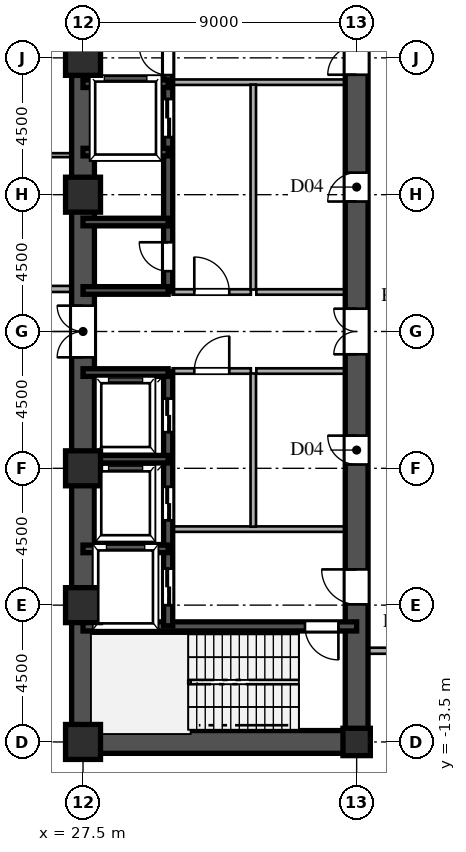
"""IFC4 building model, lengths in metres.
Left out: names, types, materials, properties, quantities, classifications, styles, units other than length and angle.
Written with IfcOpenShell. Run it as: python <this file> out.ifc"""

import sys

from ifc_helpers import new_model, si_unit, direction, frame, frame_2d, origin, origin_2d, place, context, subcontext, project, spatial, rectangle, hollow_rectangle, i_section, extrude, source, transform, mapped, element, fill, save


model = new_model("IFC4")
c1 = context("Model", 3, precision=1e-05, world=origin(), true_north=direction((0.0, 1.0)))
c2 = subcontext(c1, "Body", "Model", "MODEL_VIEW")
j1 = project(units=[si_unit("LENGTHUNIT", "METRE"), si_unit("PLANEANGLEUNIT", "RADIAN")], contexts=[c1])
p1 = place(None, origin())
s1 = spatial("IfcSite", under=j1, at=p1, CompositionType="ELEMENT")
p2 = place(p1, origin())
s2 = spatial("IfcBuilding", under=s1, at=p2, CompositionType="ELEMENT")
p3 = place(p2, frame((0.0, 0.0, -4.8)))
s3 = spatial("IfcBuildingStorey", under=s2, at=p3, CompositionType="ELEMENT", Elevation=-4.8)
m1 = source(origin(), c2, "Body", "SweptSolid", [
    extrude(hollow_rectangle(XDim=1.15, YDim=1.15, WallThickness=0.048, at=origin_2d()), origin(), (0.0, 0.0, 1.0), 4.8),
])
for number, where, z_axis, x_axis in (
    (1, (27.5, -13.5, 0.0), (0.0, 0.0, 1.0), (1.0, 0.0, 0.0)),
    (2, (27.5, -9.0, 0.0), (0.0, 0.0, 1.0), (1.0, 0.0, 0.0)),
    (3, (27.5, -4.5, 0.0), (0.0, 0.0, 1.0), (1.0, 0.0, 0.0)),
    (4, (27.5, 4.5, 0.0), (0.0, 0.0, 1.0), (1.0, 0.0, 0.0)),
    (5, (27.5, 9.0, 0.0), (0.0, 0.0, 1.0), (1.0, 0.0, 0.0)),
):
    element("IfcColumn", number, at=place(p3, frame(where, z_axis=z_axis, x_axis=x_axis)), inside=s3, PredefinedType="COLUMN", context=c2, shape_type="MappedRepresentation", body=[
        mapped(m1, transform((0.0, 0.0, 0.0), scale=1.0)),
    ])
m2 = source(origin(), c2, "Body", "SweptSolid", [
    extrude(i_section(OverallWidth=0.9, OverallDepth=0.9, WebThickness=0.036, FlangeThickness=0.055, at=origin_2d()), origin(), (0.0, 0.0, 1.0), 4.8),
])
p4 = place(p3, frame((36.5, -13.5, 0.0), z_axis=(0.0, 0.0, 1.0), x_axis=(1.0, 0.0, 0.0)))
e6 = element("IfcColumn", 6, at=p4, inside=s3, PredefinedType="COLUMN", context=c2, shape_type="MappedRepresentation", body=[
    mapped(m2, transform((0.0, 0.0, 0.0), scale=1.0)),
])
for number, where, z_axis, x_axis in (
    (7, (27.5, -13.5, 0.0), (0.0, 0.0, 1.0), (0.0, 1.0, 0.0)),
    (8, (27.5, 1.3, 0.0), (0.0, 0.0, 1.0), (0.0, 1.0, 0.0)),
):
    element("IfcWall", number, at=place(p3, frame(where, z_axis=z_axis, x_axis=x_axis)), inside=s3, PredefinedType="SHEAR", context=c2, shape_type="SweptSolid", body=[
        extrude(rectangle(XDim=12.2, YDim=0.75, at=frame_2d((6.1, 0.0))), origin(), (0.0, 0.0, 1.0), 4.52),
    ])
p5 = place(p3, frame((27.5, -1.3, 0.0), z_axis=(0.0, 0.0, 1.0), x_axis=(0.0, 1.0, 0.0)))
e9 = element("IfcWall", 9, at=p5, inside=s3, PredefinedType="SHEAR", context=c2, shape_type="SweptSolid", body=[
    extrude(rectangle(XDim=2.6, YDim=0.75, at=frame_2d((1.3, 0.0))), origin(), (0.0, 0.0, 1.0), 4.52),
])
p6 = place(p5, frame((0.45, 0.0, 0.0)))
e10 = element("IfcOpeningElement", 10, at=p6, cuts=e9, PredefinedType="OPENING", context=c2, shape_type="SweptSolid", body=[
    extrude(rectangle(XDim=1.7, YDim=2.35, at=frame_2d((0.85, 1.175))), frame((0.0, 0.385, 0.0), z_axis=(0.0, -1.0, 0.0), x_axis=(1.0, 0.0, 0.0)), (0.0, 0.0, 1.0), 0.77),
])
p7 = place(p3, frame((27.5, -13.5, 0.0), z_axis=(0.0, 0.0, 1.0), x_axis=(1.0, 0.0, 0.0)))
e11 = element("IfcWall", 11, at=p7, inside=s3, PredefinedType="SHEAR", context=c2, shape_type="SweptSolid", body=[
    extrude(rectangle(XDim=9.0, YDim=0.75, at=frame_2d((4.5, 0.0))), origin(), (0.0, 0.0, 1.0), 4.52),
])
p8 = place(p3, frame((36.5, -13.65, 0.0), z_axis=(0.0, 0.0, 1.0), x_axis=(0.0, 1.0, 0.0)))
e12 = element("IfcWall", 12, at=p8, inside=s3, PredefinedType="SHEAR", context=c2, shape_type="SweptSolid", body=[
    extrude(rectangle(XDim=7.15, YDim=0.75, at=frame_2d((3.575, 0.0))), origin(), (0.0, 0.0, 1.0), 4.52),
])
p9 = place(p8, frame((4.675, 0.0, 0.0)))
e13 = element("IfcOpeningElement", 13, at=p9, cuts=e12, PredefinedType="OPENING", context=c2, shape_type="SweptSolid", body=[
    extrude(rectangle(XDim=1.15, YDim=2.2, at=frame_2d((0.575, 1.1))), frame((0.0, 0.385, 0.0), z_axis=(0.0, -1.0, 0.0), x_axis=(1.0, 0.0, 0.0)), (0.0, 0.0, 1.0), 0.77),
])
p10 = place(p3, frame((36.5, -1.3, 0.0), z_axis=(0.0, 0.0, 1.0), x_axis=(0.0, 1.0, 0.0)))
e14 = element("IfcWall", 14, at=p10, inside=s3, PredefinedType="SHEAR", context=c2, shape_type="SweptSolid", body=[
    extrude(rectangle(XDim=2.6, YDim=0.75, at=frame_2d((1.3, 0.0))), origin(), (0.0, 0.0, 1.0), 4.52),
])
p11 = place(p10, frame((0.55, 0.0, 0.0)))
e15 = element("IfcOpeningElement", 15, at=p11, cuts=e14, PredefinedType="OPENING", context=c2, shape_type="SweptSolid", body=[
    extrude(rectangle(XDim=1.5, YDim=2.3, at=frame_2d((0.75, 1.15))), frame((0.0, 0.385, 0.0), z_axis=(0.0, -1.0, 0.0), x_axis=(1.0, 0.0, 0.0)), (0.0, 0.0, 1.0), 0.77),
])
p12 = place(p3, frame((36.5, 8.2, 0.0), z_axis=(0.0, 0.0, 1.0), x_axis=(0.0, 1.0, 0.0)))
e16 = element("IfcWall", 16, at=p12, inside=s3, PredefinedType="SHEAR", context=c2, shape_type="SweptSolid", body=[
    extrude(rectangle(XDim=5.45, YDim=0.75, at=frame_2d((2.725, 0.0))), origin(), (0.0, 0.0, 1.0), 4.52),
])
p13 = place(p12, frame((0.245, 0.0, 0.0)))
e17 = element("IfcOpeningElement", 17, at=p13, cuts=e16, PredefinedType="OPENING", context=c2, shape_type="SweptSolid", body=[
    extrude(rectangle(XDim=0.95, YDim=2.15, at=frame_2d((0.475, 1.075))), frame((0.0, 0.385, 0.0), z_axis=(0.0, -1.0, 0.0), x_axis=(1.0, 0.0, 0.0)), (0.0, 0.0, 1.0), 0.77),
])
p14 = place(p3, frame((36.5, -6.5, 0.0), z_axis=(0.0, 0.0, 1.0), x_axis=(0.0, 1.0, 0.0)))
e18 = element("IfcWall", 18, at=p14, inside=s3, PredefinedType="SHEAR", context=c2, shape_type="SweptSolid", body=[
    extrude(rectangle(XDim=5.2, YDim=0.75, at=frame_2d((2.6, 0.0))), origin(), (0.0, 0.0, 1.0), 4.52),
])
p15 = place(p14, frame((2.125, 0.0, 0.0)))
e19 = element("IfcOpeningElement", 19, at=p15, cuts=e18, PredefinedType="OPENING", context=c2, shape_type="SweptSolid", body=[
    extrude(rectangle(XDim=0.95, YDim=2.15, at=frame_2d((0.475, 1.075))), frame((0.0, 0.385, 0.0), z_axis=(0.0, -1.0, 0.0), x_axis=(1.0, 0.0, 0.0)), (0.0, 0.0, 1.0), 0.77),
])
p16 = place(p3, frame((36.5, 1.3, 0.0), z_axis=(0.0, 0.0, 1.0), x_axis=(0.0, 1.0, 0.0)))
e20 = element("IfcWall", 20, at=p16, inside=s3, PredefinedType="SHEAR", context=c2, shape_type="SweptSolid", body=[
    extrude(rectangle(XDim=6.9, YDim=0.75, at=frame_2d((3.45, 0.0))), origin(), (0.0, 0.0, 1.0), 4.52),
])
p17 = place(p16, frame((2.975, 0.0, 0.0)))
e21 = element("IfcOpeningElement", 21, at=p17, cuts=e20, PredefinedType="OPENING", context=c2, shape_type="SweptSolid", body=[
    extrude(rectangle(XDim=0.95, YDim=2.15, at=frame_2d((0.475, 1.075))), frame((0.0, 0.385, 0.0), z_axis=(0.0, -1.0, 0.0), x_axis=(1.0, 0.0, 0.0)), (0.0, 0.0, 1.0), 0.77),
])
p18 = place(p3, frame((27.5, -9.7, 0.0), z_axis=(0.0, 0.0, 1.0), x_axis=(1.0, 0.0, 0.0)))
e22 = element("IfcWall", 22, at=p18, inside=s3, PredefinedType="SHEAR", context=c2, shape_type="SweptSolid", body=[
    extrude(rectangle(XDim=9.0, YDim=0.3, at=frame_2d((4.5, 0.0))), origin(), (0.0, 0.0, 1.0), 4.52),
])
p19 = place(p18, frame((7.3, 0.0, 0.0)))
e23 = element("IfcOpeningElement", 23, at=p19, cuts=e22, PredefinedType="OPENING", context=c2, shape_type="SweptSolid", body=[
    extrude(rectangle(XDim=1.1, YDim=2.2, at=frame_2d((0.55, 1.1))), frame((0.0, 0.16, 0.0), z_axis=(0.0, -1.0, 0.0), x_axis=(1.0, 0.0, 0.0)), (0.0, 0.0, 1.0), 0.32),
])
for number, where, z_axis, x_axis in (
    (24, (27.5, -7.15, 0.0), (0.0, 0.0, 1.0), (1.0, 0.0, 0.0)),
    (25, (27.5, -4.2, 0.0), (0.0, 0.0, 1.0), (1.0, 0.0, 0.0)),
    (26, (27.5, -1.35, 0.0), (0.0, 0.0, 1.0), (1.0, 0.0, 0.0)),
    (27, (27.5, 1.35, 0.0), (0.0, 0.0, 1.0), (1.0, 0.0, 0.0)),
    (28, (27.5, 3.6, 0.0), (0.0, 0.0, 1.0), (1.0, 0.0, 0.0)),
    (29, (27.5, 5.9, 0.0), (0.0, 0.0, 1.0), (1.0, 0.0, 0.0)),
    (30, (27.5, 8.15, 0.0), (0.0, 0.0, 1.0), (1.0, 0.0, 0.0)),
):
    element("IfcWall", number, at=place(p3, frame(where, z_axis=z_axis, x_axis=x_axis)), inside=s3, PredefinedType="SHEAR", context=c2, shape_type="SweptSolid", body=[
        extrude(rectangle(XDim=2.8, YDim=0.25, at=frame_2d((1.4, 0.0))), origin(), (0.0, 0.0, 1.0), 4.52),
    ])
p20 = place(p3, frame((30.3, -9.68, 0.0), z_axis=(0.0, 0.0, 1.0), x_axis=(0.0, 1.0, 0.0)))
e31 = element("IfcWall", 31, at=p20, inside=s3, PredefinedType="SHEAR", context=c2, shape_type="SweptSolid", body=[
    extrude(rectangle(XDim=2.56, YDim=0.3, at=frame_2d((1.28, 0.0))), origin(), (0.0, 0.0, 1.0), 4.52),
])
p21 = place(p20, frame((0.68, 0.0, 0.0)))
e32 = element("IfcOpeningElement", 32, at=p21, cuts=e31, PredefinedType="OPENING", context=c2, shape_type="SweptSolid", body=[
    extrude(rectangle(XDim=1.2, YDim=2.25, at=frame_2d((0.6, 1.125))), frame((0.0, 0.16, 0.0), z_axis=(0.0, -1.0, 0.0), x_axis=(1.0, 0.0, 0.0)), (0.0, 0.0, 1.0), 0.32),
])
p22 = place(p3, frame((30.3, -7.12, 0.0), z_axis=(0.0, 0.0, 1.0), x_axis=(0.0, 1.0, 0.0)))
e33 = element("IfcWall", 33, at=p22, inside=s3, PredefinedType="SHEAR", context=c2, shape_type="SweptSolid", body=[
    extrude(rectangle(XDim=2.92, YDim=0.3, at=frame_2d((1.46, 0.0))), origin(), (0.0, 0.0, 1.0), 4.52),
])
p23 = place(p22, frame((0.91, 0.0, 0.0)))
e34 = element("IfcOpeningElement", 34, at=p23, cuts=e33, PredefinedType="OPENING", context=c2, shape_type="SweptSolid", body=[
    extrude(rectangle(XDim=1.1, YDim=2.2, at=frame_2d((0.55, 1.1))), frame((0.0, 0.16, 0.0), z_axis=(0.0, -1.0, 0.0), x_axis=(1.0, 0.0, 0.0)), (0.0, 0.0, 1.0), 0.32),
])
p24 = place(p3, frame((30.3, -4.2, 0.0), z_axis=(0.0, 0.0, 1.0), x_axis=(0.0, 1.0, 0.0)))
e35 = element("IfcWall", 35, at=p24, inside=s3, PredefinedType="SHEAR", context=c2, shape_type="SweptSolid", body=[
    extrude(rectangle(XDim=2.88, YDim=0.3, at=frame_2d((1.44, 0.0))), origin(), (0.0, 0.0, 1.0), 4.52),
])
p25 = place(p24, frame((0.89, 0.0, 0.0)))
e36 = element("IfcOpeningElement", 36, at=p25, cuts=e35, PredefinedType="OPENING", context=c2, shape_type="SweptSolid", body=[
    extrude(rectangle(XDim=1.1, YDim=2.2, at=frame_2d((0.55, 1.1))), frame((0.0, 0.16, 0.0), z_axis=(0.0, -1.0, 0.0), x_axis=(1.0, 0.0, 0.0)), (0.0, 0.0, 1.0), 0.32),
])
p26 = place(p3, frame((30.3, 1.32, 0.0), z_axis=(0.0, 0.0, 1.0), x_axis=(0.0, 1.0, 0.0)))
e37 = element("IfcWall", 37, at=p26, inside=s3, PredefinedType="SHEAR", context=c2, shape_type="SweptSolid", body=[
    extrude(rectangle(XDim=2.28, YDim=0.3, at=frame_2d((1.14, 0.0))), origin(), (0.0, 0.0, 1.0), 4.52),
])
p27 = place(p26, frame((0.665, 0.0, 0.0)))
e38 = element("IfcOpeningElement", 38, at=p27, cuts=e37, PredefinedType="OPENING", context=c2, shape_type="SweptSolid", body=[
    extrude(rectangle(XDim=0.95, YDim=2.15, at=frame_2d((0.475, 1.075))), frame((0.0, 0.16, 0.0), z_axis=(0.0, -1.0, 0.0), x_axis=(1.0, 0.0, 0.0)), (0.0, 0.0, 1.0), 0.32),
])
p28 = place(p3, frame((30.3, 3.6, 0.0), z_axis=(0.0, 0.0, 1.0), x_axis=(0.0, 1.0, 0.0)))
e39 = element("IfcWall", 39, at=p28, inside=s3, PredefinedType="SHEAR", context=c2, shape_type="SweptSolid", body=[
    extrude(rectangle(XDim=2.3, YDim=0.3, at=frame_2d((1.15, 0.0))), origin(), (0.0, 0.0, 1.0), 4.52),
])
p29 = place(p3, frame((30.3, 5.9, 0.0), z_axis=(0.0, 0.0, 1.0), x_axis=(0.0, 1.0, 0.0)))
e40 = element("IfcWall", 40, at=p29, inside=s3, PredefinedType="SHEAR", context=c2, shape_type="SweptSolid", body=[
    extrude(rectangle(XDim=2.25, YDim=0.3, at=frame_2d((1.125, 0.0))), origin(), (0.0, 0.0, 1.0), 4.52),
])
p30 = place(p29, frame((0.495, 0.0, 0.0)))
e41 = element("IfcOpeningElement", 41, at=p30, cuts=e40, PredefinedType="OPENING", context=c2, shape_type="SweptSolid", body=[
    extrude(rectangle(XDim=1.25, YDim=2.3, at=frame_2d((0.625, 1.15))), frame((0.0, 0.16, 0.0), z_axis=(0.0, -1.0, 0.0), x_axis=(1.0, 0.0, 0.0)), (0.0, 0.0, 1.0), 0.32),
])
p31 = place(p3, frame((30.3, 8.15, 0.0), z_axis=(0.0, 0.0, 1.0), x_axis=(0.0, 1.0, 0.0)))
e42 = element("IfcWall", 42, at=p31, inside=s3, PredefinedType="SHEAR", context=c2, shape_type="SweptSolid", body=[
    extrude(rectangle(XDim=1.53, YDim=0.3, at=frame_2d((0.765, 0.0))), origin(), (0.0, 0.0, 1.0), 4.52),
])
p32 = place(p31, frame((0.285, 0.0, 0.0)))
e43 = element("IfcOpeningElement", 43, at=p32, cuts=e42, PredefinedType="OPENING", context=c2, shape_type="SweptSolid", body=[
    extrude(rectangle(XDim=0.95, YDim=2.15, at=frame_2d((0.475, 1.075))), frame((0.0, 0.16, 0.0), z_axis=(0.0, -1.0, 0.0), x_axis=(1.0, 0.0, 0.0)), (0.0, 0.0, 1.0), 0.32),
])
for number, where, z_axis, x_axis in (
    (44, (30.45, -6.5, 0.0), (0.0, 0.0, 1.0), (1.0, 0.0, 0.0)),
    (45, (30.45, 8.2, 0.0), (0.0, 0.0, 1.0), (1.0, 0.0, 0.0)),
):
    element("IfcWall", number, at=place(p3, frame(where, z_axis=z_axis, x_axis=x_axis)), inside=s3, PredefinedType="PARTITIONING", context=c2, shape_type="SweptSolid", body=[
        extrude(rectangle(XDim=5.7, YDim=0.18, at=frame_2d((2.85, 0.0))), origin(), (0.0, 0.0, 1.0), 4.52),
    ])
p33 = place(p3, frame((33.1, -6.42, 0.0), z_axis=(0.0, 0.0, 1.0), x_axis=(0.0, 1.0, 0.0)))
e46 = element("IfcWall", 46, at=p33, inside=s3, PredefinedType="PARTITIONING", context=c2, shape_type="SweptSolid", body=[
    extrude(rectangle(XDim=5.04, YDim=0.18, at=frame_2d((2.52, 0.0))), origin(), (0.0, 0.0, 1.0), 4.52),
])
p34 = place(p3, frame((33.1, 1.38, 0.0), z_axis=(0.0, 0.0, 1.0), x_axis=(0.0, 1.0, 0.0)))
e47 = element("IfcWall", 47, at=p34, inside=s3, PredefinedType="PARTITIONING", context=c2, shape_type="SweptSolid", body=[
    extrude(rectangle(XDim=6.74, YDim=0.18, at=frame_2d((3.37, 0.0))), origin(), (0.0, 0.0, 1.0), 4.52),
])
p35 = place(p3, frame((30.45, -1.3, 0.0), z_axis=(0.0, 0.0, 1.0), x_axis=(1.0, 0.0, 0.0)))
e48 = element("IfcWall", 48, at=p35, inside=s3, PredefinedType="PARTITIONING", context=c2, shape_type="SweptSolid", body=[
    extrude(rectangle(XDim=2.57, YDim=0.18, at=frame_2d((1.285, 0.0))), origin(), (0.0, 0.0, 1.0), 4.52),
])
p36 = place(p35, frame((0.71, 0.0, 0.0)))
e49 = element("IfcOpeningElement", 49, at=p36, cuts=e48, PredefinedType="OPENING", context=c2, shape_type="SweptSolid", body=[
    extrude(rectangle(XDim=1.15, YDim=2.2, at=frame_2d((0.575, 1.1))), frame((0.0, 0.1, 0.0), z_axis=(0.0, -1.0, 0.0), x_axis=(1.0, 0.0, 0.0)), (0.0, 0.0, 1.0), 0.2),
])
p37 = place(p3, frame((30.45, 1.3, 0.0), z_axis=(0.0, 0.0, 1.0), x_axis=(1.0, 0.0, 0.0)))
e50 = element("IfcWall", 50, at=p37, inside=s3, PredefinedType="PARTITIONING", context=c2, shape_type="SweptSolid", body=[
    extrude(rectangle(XDim=2.57, YDim=0.18, at=frame_2d((1.285, 0.0))), origin(), (0.0, 0.0, 1.0), 4.52),
])
p38 = place(p37, frame((0.71, 0.0, 0.0)))
e51 = element("IfcOpeningElement", 51, at=p38, cuts=e50, PredefinedType="OPENING", context=c2, shape_type="SweptSolid", body=[
    extrude(rectangle(XDim=1.15, YDim=2.2, at=frame_2d((0.575, 1.1))), frame((0.0, 0.1, 0.0), z_axis=(0.0, -1.0, 0.0), x_axis=(1.0, 0.0, 0.0)), (0.0, 0.0, 1.0), 0.2),
])
for number, where, z_axis, x_axis in (
    (52, (33.2, -1.3, 0.0), (0.0, 0.0, 1.0), (1.0, 0.0, 0.0)),
    (53, (33.2, 1.3, 0.0), (0.0, 0.0, 1.0), (1.0, 0.0, 0.0)),
):
    element("IfcWall", number, at=place(p3, frame(where, z_axis=z_axis, x_axis=x_axis)), inside=s3, PredefinedType="PARTITIONING", context=c2, shape_type="SweptSolid", body=[
        extrude(rectangle(XDim=2.95, YDim=0.18, at=frame_2d((1.475, 0.0))), origin(), (0.0, 0.0, 1.0), 4.52),
    ])
p39 = place(p3, frame((36.88, -10.5, 0.0), z_axis=(0.0, 0.0, 1.0), x_axis=(1.0, 0.0, 0.0)))
e54 = element("IfcWall", 54, at=p39, inside=s3, PredefinedType="PARTITIONING", context=c2, shape_type="SweptSolid", body=[
    extrude(rectangle(XDim=2.035, YDim=0.2, at=frame_2d((1.018, 0.0))), origin(), (0.0, 0.0, 1.0), 4.52),
])
p40 = place(p3, frame((-27.12, 1.4, 0.0), z_axis=(0.0, 0.0, 1.0), x_axis=(1.0, 0.0, 0.0)))
e55 = element("IfcWall", 55, at=p40, inside=s3, PredefinedType="PARTITIONING", context=c2, shape_type="SweptSolid", body=[
    extrude(rectangle(XDim=54.24, YDim=0.2, at=frame_2d((27.12, 0.0))), origin(), (0.0, 0.0, 1.0), 4.52),
])
p41 = place(p40, frame((19.545, 0.0, 0.0)))
e56 = element("IfcOpeningElement", 56, at=p41, cuts=e55, PredefinedType="OPENING", context=c2, shape_type="SweptSolid", body=[
    extrude(rectangle(XDim=1.15, YDim=2.2, at=frame_2d((0.575, 1.1))), frame((0.0, 0.11, 0.0), z_axis=(0.0, -1.0, 0.0), x_axis=(1.0, 0.0, 0.0)), (0.0, 0.0, 1.0), 0.22),
])
p42 = place(p40, frame((46.93, 0.0, 0.0)))
e57 = element("IfcOpeningElement", 57, at=p42, cuts=e55, PredefinedType="OPENING", context=c2, shape_type="SweptSolid", body=[
    extrude(rectangle(XDim=0.88, YDim=2.1, at=frame_2d((0.44, 1.05))), frame((0.0, 0.11, 0.0), z_axis=(0.0, -1.0, 0.0), x_axis=(1.0, 0.0, 0.0)), (0.0, 0.0, 1.0), 0.22),
])
p43 = place(p3, frame((18.085, 5.8, 0.0), z_axis=(0.0, 0.0, 1.0), x_axis=(1.0, 0.0, 0.0)))
e58 = element("IfcWall", 58, at=p43, inside=s3, PredefinedType="PARTITIONING", context=c2, shape_type="SweptSolid", body=[
    extrude(rectangle(XDim=9.035, YDim=0.13, at=frame_2d((4.518, 0.0))), origin(), (0.0, 0.0, 1.0), 4.52),
])
m3 = source(origin(), c2, "Body", "SweptSolid", [
    extrude(rectangle(XDim=1.7, YDim=2.35, at=frame_2d((0.85, 1.175))), frame((0.0, 0.025, 0.0), z_axis=(0.0, -1.0, 0.0), x_axis=(1.0, 0.0, 0.0)), (0.0, 0.0, 1.0), 0.05),
])
p44 = place(p6, origin())
e59 = element("IfcDoor", 59, at=p44, inside=s3, OperationType="DOUBLE_SWING_LEFT", PredefinedType="DOOR", context=c2, shape_type="MappedRepresentation", body=[
    mapped(m3, transform((0.0, 0.0, 0.0), scale=1.0)),
])
fill(e10, e59)
m4 = source(origin(), c2, "Body", "SweptSolid", [
    extrude(rectangle(XDim=1.15, YDim=2.2, at=frame_2d((0.575, 1.1))), frame((0.0, 0.025, 0.0), z_axis=(0.0, -1.0, 0.0), x_axis=(1.0, 0.0, 0.0)), (0.0, 0.0, 1.0), 0.05),
])
p45 = place(p9, origin())
e60 = element("IfcDoor", 60, at=p45, inside=s3, OperationType="SINGLE_SWING_RIGHT", PredefinedType="DOOR", context=c2, shape_type="MappedRepresentation", body=[
    mapped(m4, transform((0.0, 0.0, 0.0), scale=1.0)),
])
fill(e13, e60)
m5 = source(origin(), c2, "Body", "SweptSolid", [
    extrude(rectangle(XDim=1.5, YDim=2.3, at=frame_2d((0.75, 1.15))), frame((0.0, 0.025, 0.0), z_axis=(0.0, -1.0, 0.0), x_axis=(1.0, 0.0, 0.0)), (0.0, 0.0, 1.0), 0.05),
])
p46 = place(p11, origin())
e61 = element("IfcDoor", 61, at=p46, inside=s3, OperationType="DOUBLE_SWING_LEFT", PredefinedType="DOOR", context=c2, shape_type="MappedRepresentation", body=[
    mapped(m5, transform((0.0, 0.0, 0.0), scale=1.0)),
])
fill(e15, e61)
m6 = source(origin(), c2, "Body", "SweptSolid", [
    extrude(rectangle(XDim=0.95, YDim=2.15, at=frame_2d((0.475, 1.075))), frame((0.0, 0.025, 0.0), z_axis=(0.0, -1.0, 0.0), x_axis=(1.0, 0.0, 0.0)), (0.0, 0.0, 1.0), 0.05),
])
p47 = place(p13, origin())
e62 = element("IfcDoor", 62, at=p47, inside=s3, OperationType="SINGLE_SWING_LEFT", PredefinedType="DOOR", context=c2, shape_type="MappedRepresentation", body=[
    mapped(m6, transform((0.0, 0.0, 0.0), scale=1.0)),
])
fill(e17, e62)
p48 = place(p15, origin())
e63 = element("IfcDoor", 63, at=p48, inside=s3, OperationType="SINGLE_SWING_RIGHT", PredefinedType="DOOR", context=c2, shape_type="MappedRepresentation", body=[
    mapped(m6, transform((0.0, 0.0, 0.0), scale=1.0)),
])
fill(e19, e63)
p49 = place(p17, origin())
e64 = element("IfcDoor", 64, at=p49, inside=s3, OperationType="SINGLE_SWING_LEFT", PredefinedType="DOOR", context=c2, shape_type="MappedRepresentation", body=[
    mapped(m6, transform((0.0, 0.0, 0.0), scale=1.0)),
])
fill(e21, e64)
m7 = source(origin(), c2, "Body", "SweptSolid", [
    extrude(rectangle(XDim=1.1, YDim=2.2, at=frame_2d((0.55, 1.1))), frame((0.0, 0.025, 0.0), z_axis=(0.0, -1.0, 0.0), x_axis=(1.0, 0.0, 0.0)), (0.0, 0.0, 1.0), 0.05),
])
p50 = place(p19, frame((1.1, 0.0, 0.0), z_axis=(0.0, 0.0, 1.0), x_axis=(-1.0, 0.0, 0.0)))
e65 = element("IfcDoor", 65, at=p50, inside=s3, OperationType="SINGLE_SWING_RIGHT", PredefinedType="DOOR", context=c2, shape_type="MappedRepresentation", body=[
    mapped(m7, transform((0.0, 0.0, 0.0), scale=1.0)),
])
fill(e23, e65)
m8 = source(origin(), c2, "Body", "SweptSolid", [
    extrude(rectangle(XDim=1.2, YDim=2.25, at=frame_2d((0.6, 1.125))), frame((0.0, 0.025, 0.0), z_axis=(0.0, -1.0, 0.0), x_axis=(1.0, 0.0, 0.0)), (0.0, 0.0, 1.0), 0.05),
])
p51 = place(p21, origin())
e66 = element("IfcDoor", 66, at=p51, inside=s3, OperationType="DOUBLE_DOOR_SLIDING", PredefinedType="DOOR", context=c2, shape_type="MappedRepresentation", body=[
    mapped(m8, transform((0.0, 0.0, 0.0), scale=1.0)),
])
fill(e32, e66)
m9 = source(origin(), c2, "Body", "SweptSolid", [
    extrude(rectangle(XDim=1.1, YDim=2.2, at=frame_2d((0.55, 1.1))), frame((0.0, 0.025, 0.0), z_axis=(0.0, -1.0, 0.0), x_axis=(1.0, 0.0, 0.0)), (0.0, 0.0, 1.0), 0.05),
])
p52 = place(p23, origin())
e67 = element("IfcDoor", 67, at=p52, inside=s3, OperationType="DOUBLE_DOOR_SLIDING", PredefinedType="DOOR", context=c2, shape_type="MappedRepresentation", body=[
    mapped(m9, transform((0.0, 0.0, 0.0), scale=1.0)),
])
fill(e34, e67)
p53 = place(p25, origin())
e68 = element("IfcDoor", 68, at=p53, inside=s3, OperationType="DOUBLE_DOOR_SLIDING", PredefinedType="DOOR", context=c2, shape_type="MappedRepresentation", body=[
    mapped(m9, transform((0.0, 0.0, 0.0), scale=1.0)),
])
fill(e36, e68)
p54 = place(p27, origin())
e69 = element("IfcDoor", 69, at=p54, inside=s3, OperationType="SINGLE_SWING_RIGHT", PredefinedType="DOOR", context=c2, shape_type="MappedRepresentation", body=[
    mapped(m6, transform((0.0, 0.0, 0.0), scale=1.0)),
])
fill(e38, e69)
m10 = source(origin(), c2, "Body", "SweptSolid", [
    extrude(rectangle(XDim=1.25, YDim=2.3, at=frame_2d((0.625, 1.15))), frame((0.0, 0.025, 0.0), z_axis=(0.0, -1.0, 0.0), x_axis=(1.0, 0.0, 0.0)), (0.0, 0.0, 1.0), 0.05),
])
p55 = place(p30, origin())
e70 = element("IfcDoor", 70, at=p55, inside=s3, OperationType="DOUBLE_DOOR_SLIDING", PredefinedType="DOOR", context=c2, shape_type="MappedRepresentation", body=[
    mapped(m10, transform((0.0, 0.0, 0.0), scale=1.0)),
])
fill(e41, e70)
p56 = place(p32, origin())
e71 = element("IfcDoor", 71, at=p56, inside=s3, OperationType="SINGLE_SWING_RIGHT", PredefinedType="DOOR", context=c2, shape_type="MappedRepresentation", body=[
    mapped(m6, transform((0.0, 0.0, 0.0), scale=1.0)),
])
fill(e43, e71)
p57 = place(p36, origin())
e72 = element("IfcDoor", 72, at=p57, inside=s3, OperationType="SINGLE_SWING_RIGHT", PredefinedType="DOOR", context=c2, shape_type="MappedRepresentation", body=[
    mapped(m4, transform((0.0, 0.0, 0.0), scale=1.0)),
])
fill(e49, e72)
p58 = place(p38, origin())
e73 = element("IfcDoor", 73, at=p58, inside=s3, OperationType="SINGLE_SWING_LEFT", PredefinedType="DOOR", context=c2, shape_type="MappedRepresentation", body=[
    mapped(m4, transform((0.0, 0.0, 0.0), scale=1.0)),
])
fill(e51, e73)
save(model, sys.argv[1])
